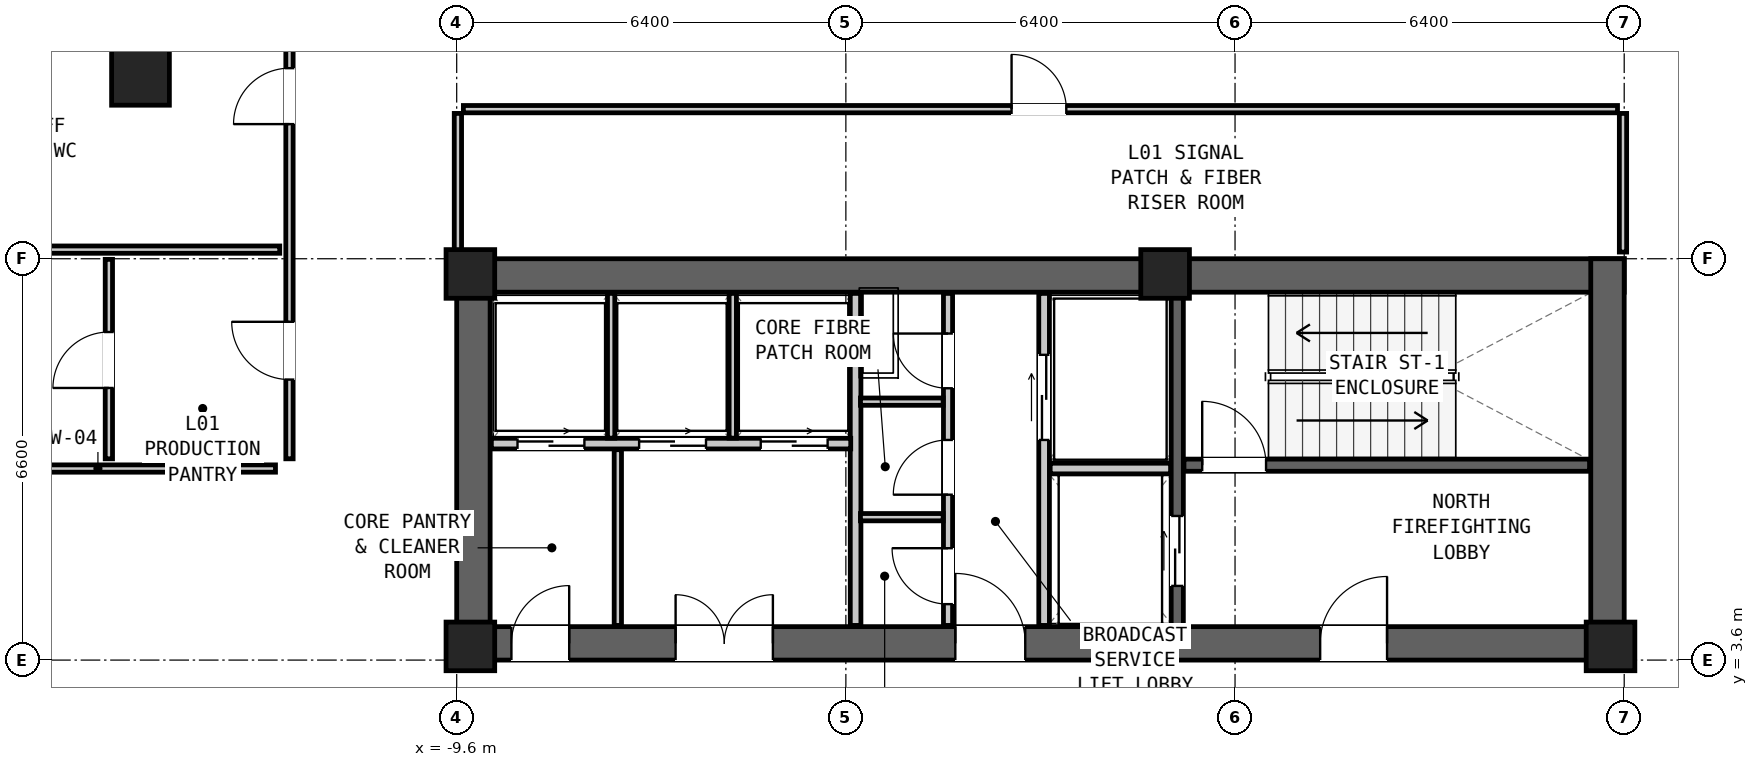
"""IFC4 building model, lengths in metres.
Left out: names, types, materials, properties, quantities, classifications, styles, units other than length and angle.
Written with IfcOpenShell. Run it as: python <this file> out.ifc"""

import sys

from ifc_helpers import new_model, si_unit, direction, frame, frame_2d, origin, origin_2d, place, context, subcontext, project, spatial, rectangle, hollow_rectangle, extrude, element, fill, save


model = new_model("IFC4")
c1 = context("Model", 3, precision=1e-05, world=origin(), true_north=direction((0.0, 1.0)))
c2 = subcontext(c1, "Body", "Model", "MODEL_VIEW")
j1 = project(units=[si_unit("LENGTHUNIT", "METRE"), si_unit("PLANEANGLEUNIT", "RADIAN")], contexts=[c1])
p1 = place(None, origin())
s1 = spatial("IfcSite", under=j1, at=p1, CompositionType="ELEMENT")
p2 = place(p1, origin())
s2 = spatial("IfcBuilding", under=s1, at=p2, CompositionType="ELEMENT")
p3 = place(p2, frame((0.0, 0.0, 5.1)))
s3 = spatial("IfcBuildingStorey", under=s2, at=p3, CompositionType="ELEMENT", Elevation=5.1)
p4 = place(p3, frame((-9.6, 9.925, 0.0), z_axis=(0.0, 0.0, 1.0), x_axis=(1.0, 0.0, 0.0)))
e1 = element("IfcWall", 1, at=p4, inside=s3, PredefinedType="SHEAR", context=c2, shape_type="SweptSolid", body=[
    extrude(rectangle(XDim=19.2, YDim=0.55, at=frame_2d((9.6, 0.0))), origin(), (0.0, 0.0, 1.0), 4.2),
])
p5 = place(p3, frame((-9.6, 3.875, 0.0), z_axis=(0.0, 0.0, 1.0), x_axis=(1.0, 0.0, 0.0)))
e2 = element("IfcWall", 2, at=p5, inside=s3, PredefinedType="SHEAR", context=c2, shape_type="SweptSolid", body=[
    extrude(rectangle(XDim=19.2, YDim=0.55, at=frame_2d((9.6, 0.0))), origin(), (0.0, 0.0, 1.0), 4.2),
])
p6 = place(p5, frame((14.2, 0.0, 0.0)))
e3 = element("IfcOpeningElement", 3, at=p6, cuts=e2, PredefinedType="OPENING", context=c2, shape_type="SweptSolid", body=[
    extrude(rectangle(XDim=1.1, YDim=2.08, at=frame_2d((0.55, 1.04))), frame((0.0, 0.287, 0.0), z_axis=(0.0, -1.0, 0.0), x_axis=(1.0, 0.0, 0.0)), (0.0, 0.0, 1.0), 0.574),
])
p7 = place(p5, frame((8.2, 0.0, 0.0)))
e4 = element("IfcOpeningElement", 4, at=p7, cuts=e2, PredefinedType="OPENING", context=c2, shape_type="SweptSolid", body=[
    extrude(rectangle(XDim=1.15, YDim=2.1, at=frame_2d((0.575, 1.05))), frame((0.0, 0.287, 0.0), z_axis=(0.0, -1.0, 0.0), x_axis=(1.0, 0.0, 0.0)), (0.0, 0.0, 1.0), 0.574),
])
p8 = place(p5, frame((0.9, 0.0, 0.0)))
e5 = element("IfcOpeningElement", 5, at=p8, cuts=e2, PredefinedType="OPENING", context=c2, shape_type="SweptSolid", body=[
    extrude(rectangle(XDim=0.95, YDim=2.1, at=frame_2d((0.475, 1.05))), frame((0.0, 0.287, 0.0), z_axis=(0.0, -1.0, 0.0), x_axis=(1.0, 0.0, 0.0)), (0.0, 0.0, 1.0), 0.574),
])
p9 = place(p5, frame((3.6, 0.0, 0.0)))
e6 = element("IfcOpeningElement", 6, at=p9, cuts=e2, PredefinedType="OPENING", context=c2, shape_type="SweptSolid", body=[
    extrude(rectangle(XDim=1.6, YDim=2.12, at=frame_2d((0.8, 1.06))), frame((0.0, 0.287, 0.0), z_axis=(0.0, -1.0, 0.0), x_axis=(1.0, 0.0, 0.0)), (0.0, 0.0, 1.0), 0.574),
])
for number, where, z_axis, x_axis in (
    (7, (-9.325, 3.6, 0.0), (0.0, 0.0, 1.0), (0.0, 1.0, 0.0)),
    (8, (9.325, 3.6, 0.0), (0.0, 0.0, 1.0), (0.0, 1.0, 0.0)),
):
    element("IfcWall", number, at=place(p3, frame(where, z_axis=z_axis, x_axis=x_axis)), inside=s3, PredefinedType="SHEAR", context=c2, shape_type="SweptSolid", body=[
        extrude(rectangle(XDim=6.6, YDim=0.55, at=frame_2d((3.3, 0.0))), origin(), (0.0, 0.0, 1.0), 4.2),
    ])
p10 = place(p3, frame((-14.8, 13.2, 0.0), z_axis=(0.0, 0.0, 1.0), x_axis=(1.0, 0.0, 0.0)))
e9 = element("IfcColumn", 9, at=p10, inside=s3, PredefinedType="COLUMN", context=c2, shape_type="SweptSolid", body=[
    extrude(hollow_rectangle(XDim=0.95, YDim=0.95, WallThickness=0.06, at=origin_2d()), origin(), (0.0, 0.0, 1.0), 4.2),
])
for number, where, z_axis, x_axis in (
    (10, (-9.375, 9.95, 0.0), (0.0, 0.0, 1.0), (1.0, 0.0, 0.0)),
    (11, (2.05, 9.95, 0.0), (0.0, 0.0, 1.0), (1.0, 0.0, 0.0)),
    (12, (-9.375, 3.825, 0.0), (0.0, 0.0, 1.0), (1.0, 0.0, 0.0)),
    (13, (9.375, 3.825, 0.0), (0.0, 0.0, 1.0), (1.0, 0.0, 0.0)),
):
    element("IfcColumn", number, at=place(p3, frame(where, z_axis=z_axis, x_axis=x_axis)), inside=s3, PredefinedType="COLUMN", context=c2, shape_type="SweptSolid", body=[
        extrude(rectangle(XDim=0.8, YDim=0.8, at=origin_2d()), origin(), (0.0, 0.0, 1.0), 4.2),
    ])
p11 = place(p3, frame((2.36, 6.805, 0.0), z_axis=(0.0, 0.0, 1.0), x_axis=(1.0, 0.0, 0.0)))
e14 = element("IfcWall", 14, at=p11, inside=s3, PredefinedType="SHEAR", context=c2, shape_type="SweptSolid", body=[
    extrude(rectangle(XDim=6.67, YDim=0.2, at=frame_2d((3.335, 0.0))), origin(), (0.0, 0.0, 1.0), 3.88),
])
p12 = place(p11, frame((0.3, 0.0, 0.0)))
e15 = element("IfcOpeningElement", 15, at=p12, cuts=e14, PredefinedType="OPENING", context=c2, shape_type="SweptSolid", body=[
    extrude(rectangle(XDim=1.05, YDim=2.08, at=frame_2d((0.525, 1.04))), frame((0.0, 0.112, 0.0), z_axis=(0.0, -1.0, 0.0), x_axis=(1.0, 0.0, 0.0)), (0.0, 0.0, 1.0), 0.224),
])
p13 = place(p3, frame((2.25, 4.17, 0.0), z_axis=(0.0, 0.0, 1.0), x_axis=(0.0, 1.0, 0.0)))
e16 = element("IfcWall", 16, at=p13, inside=s3, PredefinedType="SHEAR", context=c2, shape_type="SweptSolid", body=[
    extrude(rectangle(XDim=5.46, YDim=0.2, at=frame_2d((2.73, 0.0))), origin(), (0.0, 0.0, 1.0), 3.88),
])
p14 = place(p13, frame((0.65, 0.0, 0.0)))
e17 = element("IfcOpeningElement", 17, at=p14, cuts=e16, PredefinedType="OPENING", context=c2, shape_type="SweptSolid", body=[
    extrude(rectangle(XDim=1.15, YDim=2.08, at=frame_2d((0.575, 1.04))), frame((0.0, 0.112, 0.0), z_axis=(0.0, -1.0, 0.0), x_axis=(1.0, 0.0, 0.0)), (0.0, 0.0, 1.0), 0.224),
])
p15 = place(p3, frame((0.06, 4.17, 0.0), z_axis=(0.0, 0.0, 1.0), x_axis=(0.0, 1.0, 0.0)))
e18 = element("IfcWall", 18, at=p15, inside=s3, PredefinedType="PARTITIONING", context=c2, shape_type="SweptSolid", body=[
    extrude(rectangle(XDim=5.46, YDim=0.175, at=frame_2d((2.73, 0.0))), origin(), (0.0, 0.0, 1.0), 3.88),
])
p16 = place(p15, frame((3.05, 0.0, 0.0)))
e19 = element("IfcOpeningElement", 19, at=p16, cuts=e18, PredefinedType="OPENING", context=c2, shape_type="SweptSolid", body=[
    extrude(rectangle(XDim=1.4, YDim=2.12, at=frame_2d((0.7, 1.06))), frame((0.0, 0.1, 0.0), z_axis=(0.0, -1.0, 0.0), x_axis=(1.0, 0.0, 0.0)), (0.0, 0.0, 1.0), 0.199),
])
p17 = place(p3, frame((0.16, 6.75, 0.0), z_axis=(0.0, 0.0, 1.0), x_axis=(1.0, 0.0, 0.0)))
e20 = element("IfcWall", 20, at=p17, inside=s3, PredefinedType="PARTITIONING", context=c2, shape_type="SweptSolid", body=[
    extrude(rectangle(XDim=1.98, YDim=0.175, at=frame_2d((0.99, 0.0))), origin(), (0.0, 0.0, 1.0), 3.88),
])
p18 = place(p3, frame((-3.04, 4.17, 0.0), z_axis=(0.0, 0.0, 1.0), x_axis=(0.0, 1.0, 0.0)))
e21 = element("IfcWall", 21, at=p18, inside=s3, PredefinedType="PARTITIONING", context=c2, shape_type="SweptSolid", body=[
    extrude(rectangle(XDim=5.46, YDim=0.175, at=frame_2d((2.73, 0.0))), origin(), (0.0, 0.0, 1.0), 3.88),
])
p19 = place(p3, frame((-1.52, 4.17, 0.0), z_axis=(0.0, 0.0, 1.0), x_axis=(0.0, 1.0, 0.0)))
e22 = element("IfcWall", 22, at=p19, inside=s3, PredefinedType="PARTITIONING", context=c2, shape_type="SweptSolid", body=[
    extrude(rectangle(XDim=5.46, YDim=0.15, at=frame_2d((2.73, 0.0))), origin(), (0.0, 0.0, 1.0), 3.88),
])
p20 = place(p19, frame((3.9, 0.0, 0.0)))
e23 = element("IfcOpeningElement", 23, at=p20, cuts=e22, PredefinedType="OPENING", context=c2, shape_type="SweptSolid", body=[
    extrude(rectangle(XDim=0.9, YDim=2.05, at=frame_2d((0.45, 1.025))), frame((0.0, 0.087, 0.0), z_axis=(0.0, -1.0, 0.0), x_axis=(1.0, 0.0, 0.0)), (0.0, 0.0, 1.0), 0.174),
])
p21 = place(p19, frame((2.15, 0.0, 0.0)))
e24 = element("IfcOpeningElement", 24, at=p21, cuts=e22, PredefinedType="OPENING", context=c2, shape_type="SweptSolid", body=[
    extrude(rectangle(XDim=0.9, YDim=2.05, at=frame_2d((0.45, 1.025))), frame((0.0, 0.087, 0.0), z_axis=(0.0, -1.0, 0.0), x_axis=(1.0, 0.0, 0.0)), (0.0, 0.0, 1.0), 0.174),
])
p22 = place(p19, frame((0.35, 0.0, 0.0)))
e25 = element("IfcOpeningElement", 25, at=p22, cuts=e22, PredefinedType="OPENING", context=c2, shape_type="SweptSolid", body=[
    extrude(rectangle(XDim=0.92, YDim=2.1, at=frame_2d((0.46, 1.05))), frame((0.0, 0.087, 0.0), z_axis=(0.0, -1.0, 0.0), x_axis=(1.0, 0.0, 0.0)), (0.0, 0.0, 1.0), 0.174),
])
for number, where, z_axis, x_axis in (
    (26, (-2.96, 5.95, 0.0), (0.0, 0.0, 1.0), (1.0, 0.0, 0.0)),
    (27, (-2.96, 7.85, 0.0), (0.0, 0.0, 1.0), (1.0, 0.0, 0.0)),
):
    element("IfcWall", number, at=place(p3, frame(where, z_axis=z_axis, x_axis=x_axis)), inside=s3, PredefinedType="PARTITIONING", context=c2, shape_type="SweptSolid", body=[
        extrude(rectangle(XDim=1.36, YDim=0.12, at=frame_2d((0.68, 0.0))), origin(), (0.0, 0.0, 1.0), 3.88),
    ])
p23 = place(p3, frame((-9.03, 7.16, 0.0), z_axis=(0.0, 0.0, 1.0), x_axis=(1.0, 0.0, 0.0)))
e28 = element("IfcWall", 28, at=p23, inside=s3, PredefinedType="PARTITIONING", context=c2, shape_type="SweptSolid", body=[
    extrude(rectangle(XDim=5.91, YDim=0.175, at=frame_2d((2.955, 0.0))), origin(), (0.0, 0.0, 1.0), 3.88),
])
p24 = place(p23, frame((0.43, 0.0, 0.0)))
e29 = element("IfcOpeningElement", 29, at=p24, cuts=e28, PredefinedType="OPENING", context=c2, shape_type="SweptSolid", body=[
    extrude(rectangle(XDim=1.1, YDim=2.06, at=frame_2d((0.55, 1.03))), frame((0.0, 0.1, 0.0), z_axis=(0.0, -1.0, 0.0), x_axis=(1.0, 0.0, 0.0)), (0.0, 0.0, 1.0), 0.199),
])
p25 = place(p23, frame((2.43, 0.0, 0.0)))
e30 = element("IfcOpeningElement", 30, at=p25, cuts=e28, PredefinedType="OPENING", context=c2, shape_type="SweptSolid", body=[
    extrude(rectangle(XDim=1.1, YDim=2.06, at=frame_2d((0.55, 1.03))), frame((0.0, 0.1, 0.0), z_axis=(0.0, -1.0, 0.0), x_axis=(1.0, 0.0, 0.0)), (0.0, 0.0, 1.0), 0.199),
])
p26 = place(p23, frame((4.43, 0.0, 0.0)))
e31 = element("IfcOpeningElement", 31, at=p26, cuts=e28, PredefinedType="OPENING", context=c2, shape_type="SweptSolid", body=[
    extrude(rectangle(XDim=1.1, YDim=2.06, at=frame_2d((0.55, 1.03))), frame((0.0, 0.1, 0.0), z_axis=(0.0, -1.0, 0.0), x_axis=(1.0, 0.0, 0.0)), (0.0, 0.0, 1.0), 0.199),
])
for number, where, z_axis, x_axis in (
    (32, (-7.06, 7.25, 0.0), (0.0, 0.0, 1.0), (0.0, 1.0, 0.0)),
    (33, (-5.06, 7.25, 0.0), (0.0, 0.0, 1.0), (0.0, 1.0, 0.0)),
):
    element("IfcWall", number, at=place(p3, frame(where, z_axis=z_axis, x_axis=x_axis)), inside=s3, PredefinedType="PARTITIONING", context=c2, shape_type="SweptSolid", body=[
        extrude(rectangle(XDim=2.38, YDim=0.12, at=frame_2d((1.19, 0.0))), origin(), (0.0, 0.0, 1.0), 3.88),
    ])
p27 = place(p3, frame((-6.95, 4.17, 0.0), z_axis=(0.0, 0.0, 1.0), x_axis=(0.0, 1.0, 0.0)))
e34 = element("IfcWall", 34, at=p27, inside=s3, PredefinedType="PARTITIONING", context=c2, shape_type="SweptSolid", body=[
    extrude(rectangle(XDim=2.89, YDim=0.12, at=frame_2d((1.445, 0.0))), origin(), (0.0, 0.0, 1.0), 3.88),
])
p28 = place(p3, frame((-18.42, 6.75, 0.0), z_axis=(0.0, 0.0, 1.0), x_axis=(1.0, 0.0, 0.0)))
e35 = element("IfcWall", 35, at=p28, inside=s3, PredefinedType="PARTITIONING", context=c2, shape_type="SweptSolid", body=[
    extrude(rectangle(XDim=5.84, YDim=0.12, at=frame_2d((2.92, 0.0))), origin(), (0.0, 0.0, 1.0), 3.88),
])
p29 = place(p3, frame((-18.49, 10.35, 0.0), z_axis=(0.0, 0.0, 1.0), x_axis=(1.0, 0.0, 0.0)))
e36 = element("IfcWall", 36, at=p29, inside=s3, PredefinedType="PARTITIONING", context=c2, shape_type="SweptSolid", body=[
    extrude(rectangle(XDim=5.98, YDim=0.12, at=frame_2d((2.99, 0.0))), origin(), (0.0, 0.0, 1.0), 3.88),
])
p30 = place(p3, frame((-15.32, 6.91, 0.0), z_axis=(0.0, 0.0, 1.0), x_axis=(0.0, 1.0, 0.0)))
e37 = element("IfcWall", 37, at=p30, inside=s3, PredefinedType="PARTITIONING", context=c2, shape_type="SweptSolid", body=[
    extrude(rectangle(XDim=3.28, YDim=0.12, at=frame_2d((1.64, 0.0))), origin(), (0.0, 0.0, 1.0), 3.88),
])
p31 = place(p30, frame((1.165, 0.0, 0.0)))
e38 = element("IfcOpeningElement", 38, at=p31, cuts=e37, PredefinedType="OPENING", context=c2, shape_type="SweptSolid", body=[
    extrude(rectangle(XDim=0.92, YDim=2.1, at=frame_2d((0.46, 1.05))), frame((0.0, 0.072, 0.0), z_axis=(0.0, -1.0, 0.0), x_axis=(1.0, 0.0, 0.0)), (0.0, 0.0, 1.0), 0.144),
])
p32 = place(p3, frame((-12.35, 6.91, 0.0), z_axis=(0.0, 0.0, 1.0), x_axis=(0.0, 1.0, 0.0)))
e39 = element("IfcWall", 39, at=p32, inside=s3, PredefinedType="PARTITIONING", context=c2, shape_type="SweptSolid", body=[
    extrude(rectangle(XDim=8.08, YDim=0.12, at=frame_2d((4.04, 0.0))), origin(), (0.0, 0.0, 1.0), 3.88),
])
p33 = place(p32, frame((1.303, 0.0, 0.0)))
e40 = element("IfcOpeningElement", 40, at=p33, cuts=e39, PredefinedType="OPENING", context=c2, shape_type="SweptSolid", body=[
    extrude(rectangle(XDim=0.95, YDim=2.1, at=frame_2d((0.475, 1.05))), frame((0.0, 0.072, 0.0), z_axis=(0.0, -1.0, 0.0), x_axis=(1.0, 0.0, 0.0)), (0.0, 0.0, 1.0), 0.144),
])
p34 = place(p32, frame((5.504, 0.0, 0.0)))
e41 = element("IfcOpeningElement", 41, at=p34, cuts=e39, PredefinedType="OPENING", context=c2, shape_type="SweptSolid", body=[
    extrude(rectangle(XDim=0.92, YDim=2.1, at=frame_2d((0.46, 1.05))), frame((0.0, 0.072, 0.0), z_axis=(0.0, -1.0, 0.0), x_axis=(1.0, 0.0, 0.0)), (0.0, 0.0, 1.0), 0.144),
])
p35 = place(p3, frame((-9.49, 12.66, 0.0), z_axis=(0.0, 0.0, 1.0), x_axis=(1.0, 0.0, 0.0)))
e42 = element("IfcWall", 42, at=p35, inside=s3, PredefinedType="PARTITIONING", context=c2, shape_type="SweptSolid", body=[
    extrude(rectangle(XDim=18.98, YDim=0.12, at=frame_2d((9.49, 0.0))), origin(), (0.0, 0.0, 1.0), 3.88),
])
p36 = place(p35, frame((9.015, 0.0, 0.0)))
e43 = element("IfcOpeningElement", 43, at=p36, cuts=e42, PredefinedType="OPENING", context=c2, shape_type="SweptSolid", body=[
    extrude(rectangle(XDim=0.9, YDim=2.05, at=frame_2d((0.45, 1.025))), frame((0.0, 0.072, 0.0), z_axis=(0.0, -1.0, 0.0), x_axis=(1.0, 0.0, 0.0)), (0.0, 0.0, 1.0), 0.144),
])
for number, where, z_axis, x_axis in (
    (44, (-9.58, 10.31, 0.0), (0.0, 0.0, 1.0), (0.0, 1.0, 0.0)),
    (45, (9.58, 10.31, 0.0), (0.0, 0.0, 1.0), (0.0, 1.0, 0.0)),
):
    element("IfcWall", number, at=place(p3, frame(where, z_axis=z_axis, x_axis=x_axis)), inside=s3, PredefinedType="PARTITIONING", context=c2, shape_type="SweptSolid", body=[
        extrude(rectangle(XDim=2.28, YDim=0.12, at=frame_2d((1.14, 0.0))), origin(), (0.0, 0.0, 1.0), 3.88),
    ])
p37 = place(p12, origin())
e46 = element("IfcDoor", 46, at=p37, inside=s3, OperationType="SINGLE_SWING_LEFT", PredefinedType="DOOR", context=c2, shape_type="SweptSolid", body=[
    extrude(rectangle(XDim=1.05, YDim=2.08, at=frame_2d((0.525, 1.04))), frame((0.0, 0.025, 0.0), z_axis=(0.0, -1.0, 0.0), x_axis=(1.0, 0.0, 0.0)), (0.0, 0.0, 1.0), 0.05),
])
fill(e15, e46)
p38 = place(p6, origin())
e47 = element("IfcDoor", 47, at=p38, inside=s3, OperationType="SINGLE_SWING_RIGHT", PredefinedType="DOOR", context=c2, shape_type="SweptSolid", body=[
    extrude(rectangle(XDim=1.1, YDim=2.08, at=frame_2d((0.55, 1.04))), frame((0.0, 0.025, 0.0), z_axis=(0.0, -1.0, 0.0), x_axis=(1.0, 0.0, 0.0)), (0.0, 0.0, 1.0), 0.05),
])
fill(e3, e47)
p39 = place(p14, origin())
e48 = element("IfcDoor", 48, at=p39, inside=s3, OperationType="DOUBLE_DOOR_SLIDING", PredefinedType="DOOR", context=c2, shape_type="SweptSolid", body=[
    extrude(rectangle(XDim=1.15, YDim=2.08, at=frame_2d((0.575, 1.04))), frame((0.0, 0.025, 0.0), z_axis=(0.0, -1.0, 0.0), x_axis=(1.0, 0.0, 0.0)), (0.0, 0.0, 1.0), 0.05),
])
fill(e17, e48)
p40 = place(p16, origin())
e49 = element("IfcDoor", 49, at=p40, inside=s3, OperationType="DOUBLE_DOOR_SLIDING", PredefinedType="DOOR", context=c2, shape_type="SweptSolid", body=[
    extrude(rectangle(XDim=1.4, YDim=2.12, at=frame_2d((0.7, 1.06))), frame((0.0, 0.025, 0.0), z_axis=(0.0, -1.0, 0.0), x_axis=(1.0, 0.0, 0.0)), (0.0, 0.0, 1.0), 0.05),
])
fill(e19, e49)
p41 = place(p7, origin())
e50 = element("IfcDoor", 50, at=p41, inside=s3, OperationType="SINGLE_SWING_LEFT", PredefinedType="DOOR", context=c2, shape_type="SweptSolid", body=[
    extrude(rectangle(XDim=1.15, YDim=2.1, at=frame_2d((0.575, 1.05))), frame((0.0, 0.025, 0.0), z_axis=(0.0, -1.0, 0.0), x_axis=(1.0, 0.0, 0.0)), (0.0, 0.0, 1.0), 0.05),
])
fill(e4, e50)
p42 = place(p20, origin())
e51 = element("IfcDoor", 51, at=p42, inside=s3, OperationType="SINGLE_SWING_RIGHT", PredefinedType="DOOR", context=c2, shape_type="SweptSolid", body=[
    extrude(rectangle(XDim=0.9, YDim=2.05, at=frame_2d((0.45, 1.025))), frame((0.0, 0.025, 0.0), z_axis=(0.0, -1.0, 0.0), x_axis=(1.0, 0.0, 0.0)), (0.0, 0.0, 1.0), 0.05),
])
fill(e23, e51)
p43 = place(p21, origin())
e52 = element("IfcDoor", 52, at=p43, inside=s3, OperationType="SINGLE_SWING_LEFT", PredefinedType="DOOR", context=c2, shape_type="SweptSolid", body=[
    extrude(rectangle(XDim=0.9, YDim=2.05, at=frame_2d((0.45, 1.025))), frame((0.0, 0.025, 0.0), z_axis=(0.0, -1.0, 0.0), x_axis=(1.0, 0.0, 0.0)), (0.0, 0.0, 1.0), 0.05),
])
fill(e24, e52)
p44 = place(p22, origin())
e53 = element("IfcDoor", 53, at=p44, inside=s3, OperationType="SINGLE_SWING_RIGHT", PredefinedType="DOOR", context=c2, shape_type="SweptSolid", body=[
    extrude(rectangle(XDim=0.92, YDim=2.1, at=frame_2d((0.46, 1.05))), frame((0.0, 0.025, 0.0), z_axis=(0.0, -1.0, 0.0), x_axis=(1.0, 0.0, 0.0)), (0.0, 0.0, 1.0), 0.05),
])
fill(e25, e53)
p45 = place(p24, origin())
e54 = element("IfcDoor", 54, at=p45, inside=s3, OperationType="DOUBLE_DOOR_SLIDING", PredefinedType="DOOR", context=c2, shape_type="SweptSolid", body=[
    extrude(rectangle(XDim=1.1, YDim=2.06, at=frame_2d((0.55, 1.03))), frame((0.0, 0.025, 0.0), z_axis=(0.0, -1.0, 0.0), x_axis=(1.0, 0.0, 0.0)), (0.0, 0.0, 1.0), 0.05),
])
fill(e29, e54)
p46 = place(p25, origin())
e55 = element("IfcDoor", 55, at=p46, inside=s3, OperationType="DOUBLE_DOOR_SLIDING", PredefinedType="DOOR", context=c2, shape_type="SweptSolid", body=[
    extrude(rectangle(XDim=1.1, YDim=2.06, at=frame_2d((0.55, 1.03))), frame((0.0, 0.025, 0.0), z_axis=(0.0, -1.0, 0.0), x_axis=(1.0, 0.0, 0.0)), (0.0, 0.0, 1.0), 0.05),
])
fill(e30, e55)
p47 = place(p26, origin())
e56 = element("IfcDoor", 56, at=p47, inside=s3, OperationType="DOUBLE_DOOR_SLIDING", PredefinedType="DOOR", context=c2, shape_type="SweptSolid", body=[
    extrude(rectangle(XDim=1.1, YDim=2.06, at=frame_2d((0.55, 1.03))), frame((0.0, 0.025, 0.0), z_axis=(0.0, -1.0, 0.0), x_axis=(1.0, 0.0, 0.0)), (0.0, 0.0, 1.0), 0.05),
])
fill(e31, e56)
p48 = place(p8, origin())
e57 = element("IfcDoor", 57, at=p48, inside=s3, OperationType="SINGLE_SWING_RIGHT", PredefinedType="DOOR", context=c2, shape_type="SweptSolid", body=[
    extrude(rectangle(XDim=0.95, YDim=2.1, at=frame_2d((0.475, 1.05))), frame((0.0, 0.025, 0.0), z_axis=(0.0, -1.0, 0.0), x_axis=(1.0, 0.0, 0.0)), (0.0, 0.0, 1.0), 0.05),
])
fill(e5, e57)
p49 = place(p9, origin())
e58 = element("IfcDoor", 58, at=p49, inside=s3, OperationType="DOUBLE_DOOR_SINGLE_SWING", PredefinedType="DOOR", context=c2, shape_type="SweptSolid", body=[
    extrude(rectangle(XDim=1.6, YDim=2.12, at=frame_2d((0.8, 1.06))), frame((0.0, 0.025, 0.0), z_axis=(0.0, -1.0, 0.0), x_axis=(1.0, 0.0, 0.0)), (0.0, 0.0, 1.0), 0.05),
])
fill(e6, e58)
p50 = place(p31, origin())
e59 = element("IfcDoor", 59, at=p50, inside=s3, OperationType="SINGLE_SWING_LEFT", PredefinedType="DOOR", context=c2, shape_type="SweptSolid", body=[
    extrude(rectangle(XDim=0.92, YDim=2.1, at=frame_2d((0.46, 1.05))), frame((0.0, 0.025, 0.0), z_axis=(0.0, -1.0, 0.0), x_axis=(1.0, 0.0, 0.0)), (0.0, 0.0, 1.0), 0.05),
])
fill(e38, e59)
p51 = place(p33, origin())
e60 = element("IfcDoor", 60, at=p51, inside=s3, OperationType="SINGLE_SWING_RIGHT", PredefinedType="DOOR", context=c2, shape_type="SweptSolid", body=[
    extrude(rectangle(XDim=0.95, YDim=2.1, at=frame_2d((0.475, 1.05))), frame((0.0, 0.025, 0.0), z_axis=(0.0, -1.0, 0.0), x_axis=(1.0, 0.0, 0.0)), (0.0, 0.0, 1.0), 0.05),
])
fill(e40, e60)
p52 = place(p34, origin())
e61 = element("IfcDoor", 61, at=p52, inside=s3, OperationType="SINGLE_SWING_LEFT", PredefinedType="DOOR", context=c2, shape_type="SweptSolid", body=[
    extrude(rectangle(XDim=0.92, YDim=2.1, at=frame_2d((0.46, 1.05))), frame((0.0, 0.025, 0.0), z_axis=(0.0, -1.0, 0.0), x_axis=(1.0, 0.0, 0.0)), (0.0, 0.0, 1.0), 0.05),
])
fill(e41, e61)
p53 = place(p36, origin())
e62 = element("IfcDoor", 62, at=p53, inside=s3, OperationType="SINGLE_SWING_LEFT", PredefinedType="DOOR", context=c2, shape_type="SweptSolid", body=[
    extrude(rectangle(XDim=0.9, YDim=2.05, at=frame_2d((0.45, 1.025))), frame((0.0, 0.025, 0.0), z_axis=(0.0, -1.0, 0.0), x_axis=(1.0, 0.0, 0.0)), (0.0, 0.0, 1.0), 0.05),
])
fill(e43, e62)
save(model, sys.argv[1])
